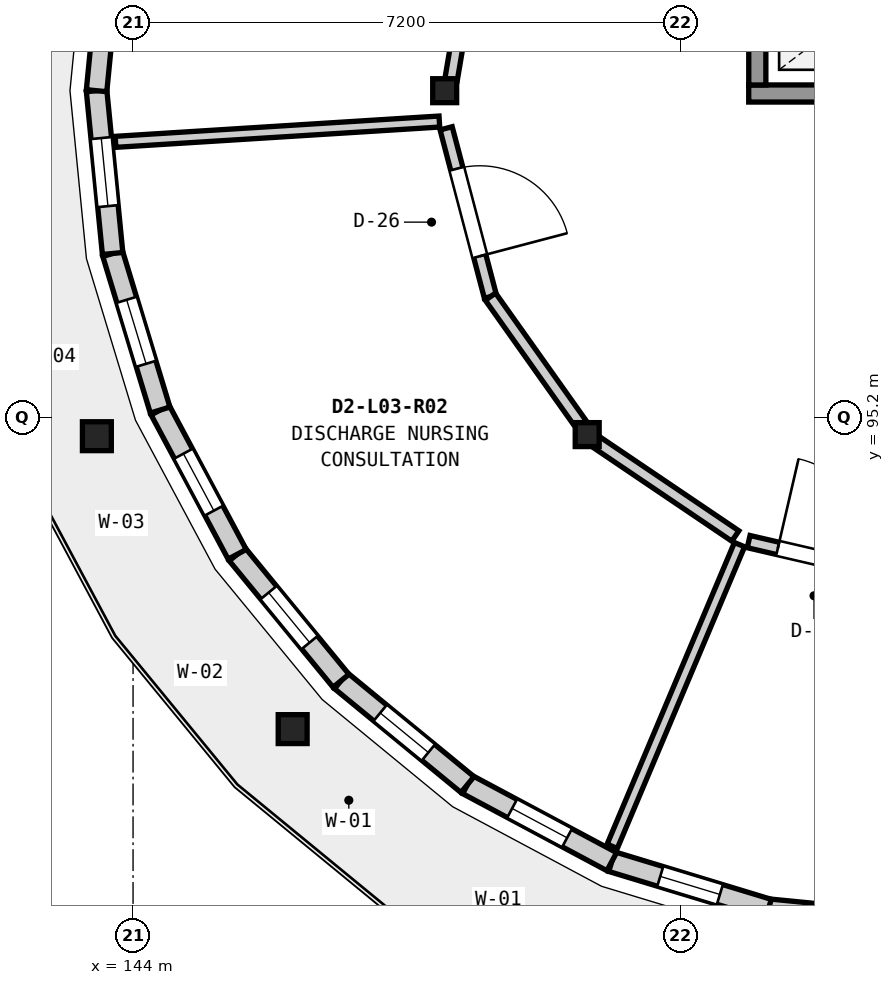
"""IFC4 building model, lengths in metres.
Left out: names, types, materials, properties, quantities, classifications, styles, units other than length and angle.
Written with IfcOpenShell. Run it as: python <this file> out.ifc"""

import sys

from ifc_helpers import new_model, si_unit, direction, frame, frame_2d, origin, origin_2d, place, context, subcontext, project, spatial, rectangle, circle, extrude, element, fill, save


model = new_model("IFC4")
c1 = context("Model", 3, precision=1e-05, world=origin(), true_north=direction((0.0, 1.0)))
c2 = subcontext(c1, "Body", "Model", "MODEL_VIEW")
j1 = project(units=[si_unit("LENGTHUNIT", "METRE"), si_unit("PLANEANGLEUNIT", "RADIAN")], contexts=[c1])
p1 = place(None, origin())
s1 = spatial("IfcSite", under=j1, at=p1, CompositionType="ELEMENT")
p2 = place(p1, origin())
s2 = spatial("IfcBuilding", under=s1, at=p2, CompositionType="ELEMENT")
p3 = place(p2, frame((0.0, 0.0, 12.95)))
s3 = spatial("IfcBuildingStorey", under=s2, at=p3, CompositionType="ELEMENT", Elevation=12.95)
for number, where, z_axis, x_axis in (
    (1, (143.524, 94.954, 0.0), (0.0, 0.0, 1.0), (1.0, 0.0, 0.0)),
    (2, (146.1, 91.1, 0.0), (0.0, 0.0, 1.0), (1.0, 0.0, 0.0)),
):
    element("IfcColumn", number, at=place(p3, frame(where, z_axis=z_axis, x_axis=x_axis)), inside=s3, PredefinedType="PILASTER", context=c2, shape_type="SweptSolid", body=[
        extrude(circle(Radius=0.19, at=origin_2d()), origin(), (0.0, 0.0, 1.0), 4.2),
    ])
for number, where, z_axis, x_axis in (
    (3, (148.1, 99.5, 0.0), (0.0, 0.0, 1.0), (1.0, 0.0, 0.0)),
    (4, (149.975, 94.975, 0.0), (0.0, 0.0, 1.0), (1.0, 0.0, 0.0)),
):
    element("IfcColumn", number, at=place(p3, frame(where, z_axis=z_axis, x_axis=x_axis)), inside=s3, PredefinedType="COLUMN", context=c2, shape_type="SweptSolid", body=[
        extrude(rectangle(XDim=0.315, YDim=0.315, at=origin_2d()), origin(), (0.0, 0.0, 1.0), 4.2),
    ])
p4 = place(p3, frame((154.5, 88.52, 0.0), z_axis=(0.0, 0.0, 1.0), x_axis=(-0.995186536277, 0.097998765368, 0.0)))
e5 = element("IfcWall", 5, at=p4, inside=s3, PredefinedType="ELEMENTEDWALL", context=c2, shape_type="SweptSolid", body=[
    extrude(rectangle(XDim=2.152, YDim=0.27, at=frame_2d((1.076, 0.0))), origin(), (0.0, 0.0, 1.0), 3.314),
])
p5 = place(p4, frame((0.666, 0.0, 0.85)))
e6 = element("IfcOpeningElement", 6, at=p5, cuts=e5, PredefinedType="OPENING", context=c2, shape_type="SweptSolid", body=[
    extrude(rectangle(XDim=0.82, YDim=1.45, at=frame_2d((0.41, 0.725))), frame((0.0, 0.145, 0.0), z_axis=(0.0, -1.0, 0.0), x_axis=(1.0, 0.0, 0.0)), (0.0, 0.0, 1.0), 0.29),
])
p6 = place(p3, frame((152.358, 88.731, 0.0), z_axis=(0.0, 0.0, 1.0), x_axis=(-0.95691941216, 0.290353644083, 0.0)))
e7 = element("IfcWall", 7, at=p6, inside=s3, PredefinedType="ELEMENTEDWALL", context=c2, shape_type="SweptSolid", body=[
    extrude(rectangle(XDim=2.153, YDim=0.27, at=frame_2d((1.076, 0.0))), origin(), (0.0, 0.0, 1.0), 3.314),
])
p7 = place(p6, frame((0.666, 0.0, 0.85)))
e8 = element("IfcOpeningElement", 8, at=p7, cuts=e7, PredefinedType="OPENING", context=c2, shape_type="SweptSolid", body=[
    extrude(rectangle(XDim=0.82, YDim=1.45, at=frame_2d((0.41, 0.725))), frame((0.0, 0.145, 0.0), z_axis=(0.0, -1.0, 0.0), x_axis=(1.0, 0.0, 0.0)), (0.0, 0.0, 1.0), 0.29),
])
p8 = place(p3, frame((150.298, 89.356, 0.0), z_axis=(0.0, 0.0, 1.0), x_axis=(-0.882007276215, 0.471235784617, 0.0)))
e9 = element("IfcWall", 9, at=p8, inside=s3, PredefinedType="ELEMENTEDWALL", context=c2, shape_type="SweptSolid", body=[
    extrude(rectangle(XDim=2.152, YDim=0.27, at=frame_2d((1.076, 0.0))), origin(), (0.0, 0.0, 1.0), 3.314),
])
p9 = place(p8, frame((0.666, 0.0, 0.85)))
e10 = element("IfcOpeningElement", 10, at=p9, cuts=e9, PredefinedType="OPENING", context=c2, shape_type="SweptSolid", body=[
    extrude(rectangle(XDim=0.82, YDim=1.45, at=frame_2d((0.41, 0.725))), frame((0.0, 0.145, 0.0), z_axis=(0.0, -1.0, 0.0), x_axis=(1.0, 0.0, 0.0)), (0.0, 0.0, 1.0), 0.29),
])
p10 = place(p3, frame((148.4, 90.37, 0.0), z_axis=(0.0, 0.0, 1.0), x_axis=(-0.772895091045, 0.634533827498, 0.0)))
e11 = element("IfcWall", 11, at=p10, inside=s3, PredefinedType="ELEMENTEDWALL", context=c2, shape_type="SweptSolid", body=[
    extrude(rectangle(XDim=2.153, YDim=0.27, at=frame_2d((1.076, 0.0))), origin(), (0.0, 0.0, 1.0), 3.314),
])
p11 = place(p10, frame((0.666, 0.0, 0.85)))
e12 = element("IfcOpeningElement", 12, at=p11, cuts=e11, PredefinedType="OPENING", context=c2, shape_type="SweptSolid", body=[
    extrude(rectangle(XDim=0.82, YDim=1.45, at=frame_2d((0.41, 0.725))), frame((0.0, 0.145, 0.0), z_axis=(0.0, -1.0, 0.0), x_axis=(1.0, 0.0, 0.0)), (0.0, 0.0, 1.0), 0.29),
])
p12 = place(p3, frame((146.736, 91.736, 0.0), z_axis=(0.0, 0.0, 1.0), x_axis=(-0.634533827498, 0.772895091045, 0.0)))
e13 = element("IfcWall", 13, at=p12, inside=s3, PredefinedType="ELEMENTEDWALL", context=c2, shape_type="SweptSolid", body=[
    extrude(rectangle(XDim=2.153, YDim=0.27, at=frame_2d((1.076, 0.0))), origin(), (0.0, 0.0, 1.0), 3.314),
])
p13 = place(p12, frame((0.651, 0.0, 0.85)))
e14 = element("IfcOpeningElement", 14, at=p13, cuts=e13, PredefinedType="OPENING", context=c2, shape_type="SweptSolid", body=[
    extrude(rectangle(XDim=0.85, YDim=1.5, at=frame_2d((0.425, 0.75))), frame((0.0, 0.145, 0.0), z_axis=(0.0, -1.0, 0.0), x_axis=(1.0, 0.0, 0.0)), (0.0, 0.0, 1.0), 0.29),
])
p14 = place(p3, frame((145.37, 93.4, 0.0), z_axis=(0.0, 0.0, 1.0), x_axis=(-0.471235784617, 0.882007276215, 0.0)))
e15 = element("IfcWall", 15, at=p14, inside=s3, PredefinedType="ELEMENTEDWALL", context=c2, shape_type="SweptSolid", body=[
    extrude(rectangle(XDim=2.152, YDim=0.27, at=frame_2d((1.076, 0.0))), origin(), (0.0, 0.0, 1.0), 3.314),
])
p15 = place(p14, frame((0.651, 0.0, 0.85)))
e16 = element("IfcOpeningElement", 16, at=p15, cuts=e15, PredefinedType="OPENING", context=c2, shape_type="SweptSolid", body=[
    extrude(rectangle(XDim=0.85, YDim=1.75, at=frame_2d((0.425, 0.875))), frame((0.0, 0.145, 0.0), z_axis=(0.0, -1.0, 0.0), x_axis=(1.0, 0.0, 0.0)), (0.0, 0.0, 1.0), 0.29),
])
p16 = place(p3, frame((144.356, 95.298, 0.0), z_axis=(0.0, 0.0, 1.0), x_axis=(-0.290353644083, 0.95691941216, 0.0)))
e17 = element("IfcWall", 17, at=p16, inside=s3, PredefinedType="ELEMENTEDWALL", context=c2, shape_type="SweptSolid", body=[
    extrude(rectangle(XDim=2.153, YDim=0.27, at=frame_2d((1.076, 0.0))), origin(), (0.0, 0.0, 1.0), 3.314),
])
p17 = place(p16, frame((0.636, 0.0, 0.85)))
e18 = element("IfcOpeningElement", 18, at=p17, cuts=e17, PredefinedType="OPENING", context=c2, shape_type="SweptSolid", body=[
    extrude(rectangle(XDim=0.88, YDim=1.6, at=frame_2d((0.44, 0.8))), frame((0.0, 0.145, 0.0), z_axis=(0.0, -1.0, 0.0), x_axis=(1.0, 0.0, 0.0)), (0.0, 0.0, 1.0), 0.29),
])
p18 = place(p3, frame((143.731, 97.358, 0.0), z_axis=(0.0, 0.0, 1.0), x_axis=(-0.097998765368, 0.995186536277, 0.0)))
e19 = element("IfcWall", 19, at=p18, inside=s3, PredefinedType="ELEMENTEDWALL", context=c2, shape_type="SweptSolid", body=[
    extrude(rectangle(XDim=2.152, YDim=0.27, at=frame_2d((1.076, 0.0))), origin(), (0.0, 0.0, 1.0), 3.314),
])
p19 = place(p18, frame((0.626, 0.0, 0.85)))
e20 = element("IfcOpeningElement", 20, at=p19, cuts=e19, PredefinedType="OPENING", context=c2, shape_type="SweptSolid", body=[
    extrude(rectangle(XDim=0.9, YDim=1.4, at=frame_2d((0.45, 0.7))), frame((0.0, 0.145, 0.0), z_axis=(0.0, -1.0, 0.0), x_axis=(1.0, 0.0, 0.0)), (0.0, 0.0, 1.0), 0.29),
])
p20 = place(p3, frame((143.52, 99.5, 0.0), z_axis=(0.0, 0.0, 1.0), x_axis=(0.097998765368, 0.995186536277, 0.0)))
e21 = element("IfcWall", 21, at=p20, inside=s3, PredefinedType="ELEMENTEDWALL", context=c2, shape_type="SweptSolid", body=[
    extrude(rectangle(XDim=2.152, YDim=0.27, at=frame_2d((1.076, 0.0))), origin(), (0.0, 0.0, 1.0), 3.314),
])
p21 = place(p20, frame((0.626, 0.0, 0.85)))
e22 = element("IfcOpeningElement", 22, at=p21, cuts=e21, PredefinedType="OPENING", context=c2, shape_type="SweptSolid", body=[
    extrude(rectangle(XDim=0.9, YDim=1.65, at=frame_2d((0.45, 0.825))), frame((0.0, 0.145, 0.0), z_axis=(0.0, -1.0, 0.0), x_axis=(1.0, 0.0, 0.0)), (0.0, 0.0, 1.0), 0.29),
])
p22 = place(p3, frame((152.1, 99.463, 0.0), z_axis=(0.0, 0.0, 1.0), x_axis=(1.0, 0.0, 0.0)))
e23 = element("IfcWall", 23, at=p22, inside=s3, PredefinedType="SHEAR", context=c2, shape_type="SweptSolid", body=[
    extrude(rectangle(XDim=3.1, YDim=0.225, at=frame_2d((1.55, 0.0))), origin(), (0.0, 0.0, 1.0), 3.96),
])
p23 = place(p22, frame((0.9, 0.0, 0.0)))
e24 = element("IfcOpeningElement", 24, at=p23, cuts=e23, PredefinedType="OPENING", context=c2, shape_type="SweptSolid", body=[
    extrude(rectangle(XDim=1.3, YDim=2.2, at=frame_2d((0.65, 1.1))), frame((0.0, 0.123, 0.0), z_axis=(0.0, -1.0, 0.0), x_axis=(1.0, 0.0, 0.0)), (0.0, 0.0, 1.0), 0.245),
])
p24 = place(p3, frame((152.213, 99.575, 0.0), z_axis=(0.0, 0.0, 1.0), x_axis=(0.0, 1.0, 0.0)))
e25 = element("IfcWall", 25, at=p24, inside=s3, PredefinedType="SHEAR", context=c2, shape_type="SweptSolid", body=[
    extrude(rectangle(XDim=2.15, YDim=0.225, at=frame_2d((1.075, 0.0))), origin(), (0.0, 0.0, 1.0), 3.96),
])
p25 = place(p3, frame((148.03, 99.094, 0.0), z_axis=(0.0, 0.0, 1.0), x_axis=(-0.998041214069, -0.062559851498, 0.0)))
e26 = element("IfcWall", 26, at=p25, inside=s3, PredefinedType="PARTITIONING", context=c2, shape_type="SweptSolid", body=[
    extrude(rectangle(XDim=4.269, YDim=0.145, at=frame_2d((2.135, 0.0))), origin(), (0.0, 0.0, 1.0), 3.279),
])
p26 = place(p3, frame((151.979, 93.527, 0.0), z_axis=(0.0, 0.0, 1.0), x_axis=(-0.388824533624, -0.921311826719, 0.0)))
e27 = element("IfcWall", 27, at=p26, inside=s3, PredefinedType="PARTITIONING", context=c2, shape_type="SweptSolid", body=[
    extrude(rectangle(XDim=4.308, YDim=0.145, at=frame_2d((2.154, 0.0))), origin(), (0.0, 0.0, 1.0), 3.279),
])
p27 = place(p3, frame((148.565, 101.896, 0.0), z_axis=(0.0, 0.0, 1.0), x_axis=(-0.166872665665, -0.985978454863, 0.0)))
e28 = element("IfcWall", 28, at=p27, inside=s3, PredefinedType="PARTITIONING", context=c2, shape_type="SweptSolid", body=[
    extrude(rectangle(XDim=2.288, YDim=0.165, at=frame_2d((1.144, 0.0))), origin(), (0.0, 0.0, 1.0), 3.279),
])
p28 = place(p3, frame((148.119, 99.005, 0.0), z_axis=(0.0, 0.0, 1.0), x_axis=(0.254556263421, -0.96705796556, 0.0)))
e29 = element("IfcWall", 29, at=p28, inside=s3, PredefinedType="PARTITIONING", context=c2, shape_type="SweptSolid", body=[
    extrude(rectangle(XDim=2.29, YDim=0.165, at=frame_2d((1.145, 0.0))), origin(), (0.0, 0.0, 1.0), 3.279),
])
p29 = place(p28, frame((0.55, 0.0, 0.0)))
e30 = element("IfcOpeningElement", 30, at=p29, cuts=e29, PredefinedType="OPENING", context=c2, shape_type="SweptSolid", body=[
    extrude(rectangle(XDim=1.19, YDim=2.26, at=frame_2d((0.595, 1.13))), frame((0.0, 0.093, 0.0), z_axis=(0.0, -1.0, 0.0), x_axis=(1.0, 0.0, 0.0)), (0.0, 0.0, 1.0), 0.185),
])
p30 = place(p3, frame((148.702, 96.79, 0.0), z_axis=(0.0, 0.0, 1.0), x_axis=(0.578673092917, -0.815559594103, 0.0)))
e31 = element("IfcWall", 31, at=p30, inside=s3, PredefinedType="PARTITIONING", context=c2, shape_type="SweptSolid", body=[
    extrude(rectangle(XDim=2.055, YDim=0.165, at=frame_2d((1.028, 0.0))), origin(), (0.0, 0.0, 1.0), 3.279),
])
p31 = place(p3, frame((150.101, 94.873, 0.0), z_axis=(0.0, 0.0, 1.0), x_axis=(0.828551404548, -0.55991300219, 0.0)))
e32 = element("IfcWall", 32, at=p31, inside=s3, PredefinedType="PARTITIONING", context=c2, shape_type="SweptSolid", body=[
    extrude(rectangle(XDim=2.2, YDim=0.165, at=frame_2d((1.1, 0.0))), origin(), (0.0, 0.0, 1.0), 3.279),
])
p32 = place(p3, frame((152.099, 93.567, 0.0), z_axis=(0.0, 0.0, 1.0), x_axis=(0.97420761257, -0.225653556611, 0.0)))
e33 = element("IfcWall", 33, at=p32, inside=s3, PredefinedType="PARTITIONING", context=c2, shape_type="SweptSolid", body=[
    extrude(rectangle(XDim=1.998, YDim=0.165, at=frame_2d((0.999, 0.0))), origin(), (0.0, 0.0, 1.0), 3.279),
])
p33 = place(p32, frame((0.394, 0.0, 0.0)))
e34 = element("IfcOpeningElement", 34, at=p33, cuts=e33, PredefinedType="OPENING", context=c2, shape_type="SweptSolid", body=[
    extrude(rectangle(XDim=1.21, YDim=2.16, at=frame_2d((0.605, 1.08))), frame((0.0, 0.093, 0.0), z_axis=(0.0, -1.0, 0.0), x_axis=(1.0, 0.0, 0.0)), (0.0, 0.0, 1.0), 0.185),
])
p34 = place(p7, origin())
e35 = element("IfcWindow", 35, at=p34, inside=s3, PartitioningType="SINGLE_PANEL", PredefinedType="WINDOW", context=c2, shape_type="SweptSolid", body=[
    extrude(rectangle(XDim=0.82, YDim=1.45, at=frame_2d((0.41, 0.725))), frame((0.0, 0.03, 0.0), z_axis=(0.0, -1.0, 0.0), x_axis=(1.0, 0.0, 0.0)), (0.0, 0.0, 1.0), 0.06),
])
fill(e8, e35)
p35 = place(p9, origin())
e36 = element("IfcWindow", 36, at=p35, inside=s3, PartitioningType="SINGLE_PANEL", PredefinedType="WINDOW", context=c2, shape_type="SweptSolid", body=[
    extrude(rectangle(XDim=0.82, YDim=1.45, at=frame_2d((0.41, 0.725))), frame((0.0, 0.03, 0.0), z_axis=(0.0, -1.0, 0.0), x_axis=(1.0, 0.0, 0.0)), (0.0, 0.0, 1.0), 0.06),
])
fill(e10, e36)
p36 = place(p11, origin())
e37 = element("IfcWindow", 37, at=p36, inside=s3, PartitioningType="SINGLE_PANEL", PredefinedType="WINDOW", context=c2, shape_type="SweptSolid", body=[
    extrude(rectangle(XDim=0.82, YDim=1.45, at=frame_2d((0.41, 0.725))), frame((0.0, 0.03, 0.0), z_axis=(0.0, -1.0, 0.0), x_axis=(1.0, 0.0, 0.0)), (0.0, 0.0, 1.0), 0.06),
])
fill(e12, e37)
p37 = place(p13, origin())
e38 = element("IfcWindow", 38, at=p37, inside=s3, PartitioningType="SINGLE_PANEL", PredefinedType="WINDOW", context=c2, shape_type="SweptSolid", body=[
    extrude(rectangle(XDim=0.85, YDim=1.5, at=frame_2d((0.425, 0.75))), frame((0.0, 0.03, 0.0), z_axis=(0.0, -1.0, 0.0), x_axis=(1.0, 0.0, 0.0)), (0.0, 0.0, 1.0), 0.06),
])
fill(e14, e38)
p38 = place(p15, origin())
e39 = element("IfcWindow", 39, at=p38, inside=s3, PartitioningType="SINGLE_PANEL", PredefinedType="WINDOW", context=c2, shape_type="SweptSolid", body=[
    extrude(rectangle(XDim=0.85, YDim=1.75, at=frame_2d((0.425, 0.875))), frame((0.0, 0.03, 0.0), z_axis=(0.0, -1.0, 0.0), x_axis=(1.0, 0.0, 0.0)), (0.0, 0.0, 1.0), 0.06),
])
fill(e16, e39)
p39 = place(p17, origin())
e40 = element("IfcWindow", 40, at=p39, inside=s3, PartitioningType="SINGLE_PANEL", PredefinedType="WINDOW", context=c2, shape_type="SweptSolid", body=[
    extrude(rectangle(XDim=0.88, YDim=1.6, at=frame_2d((0.44, 0.8))), frame((0.0, 0.03, 0.0), z_axis=(0.0, -1.0, 0.0), x_axis=(1.0, 0.0, 0.0)), (0.0, 0.0, 1.0), 0.06),
])
fill(e18, e40)
p40 = place(p19, origin())
e41 = element("IfcWindow", 41, at=p40, inside=s3, PartitioningType="SINGLE_PANEL", PredefinedType="WINDOW", context=c2, shape_type="SweptSolid", body=[
    extrude(rectangle(XDim=0.9, YDim=1.4, at=frame_2d((0.45, 0.7))), frame((0.0, 0.03, 0.0), z_axis=(0.0, -1.0, 0.0), x_axis=(1.0, 0.0, 0.0)), (0.0, 0.0, 1.0), 0.06),
])
fill(e20, e41)
p41 = place(p29, origin())
e42 = element("IfcDoor", 42, at=p41, inside=s3, OperationType="SINGLE_SWING_RIGHT", PredefinedType="DOOR", context=c2, shape_type="SweptSolid", body=[
    extrude(rectangle(XDim=1.19, YDim=2.26, at=frame_2d((0.595, 1.13))), frame((0.0, 0.025, 0.0), z_axis=(0.0, -1.0, 0.0), x_axis=(1.0, 0.0, 0.0)), (0.0, 0.0, 1.0), 0.05),
])
fill(e30, e42)
p42 = place(p33, origin())
e43 = element("IfcDoor", 43, at=p42, inside=s3, OperationType="SINGLE_SWING_LEFT", PredefinedType="DOOR", context=c2, shape_type="SweptSolid", body=[
    extrude(rectangle(XDim=1.21, YDim=2.16, at=frame_2d((0.605, 1.08))), frame((0.0, 0.025, 0.0), z_axis=(0.0, -1.0, 0.0), x_axis=(1.0, 0.0, 0.0)), (0.0, 0.0, 1.0), 0.05),
])
fill(e34, e43)
save(model, sys.argv[1])
